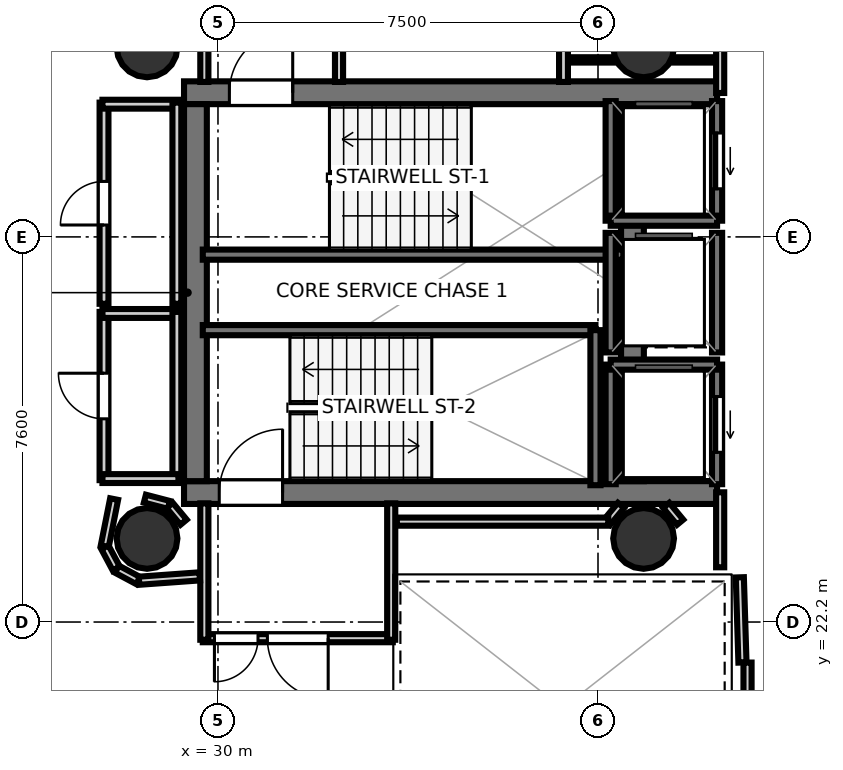
"""IFC4 building model, lengths in metres.
Left out: names, types, materials, properties, quantities, classifications, styles, units other than length and angle.
Written with IfcOpenShell. Run it as: python <this file> out.ifc"""

import sys

from ifc_helpers import new_model, si_unit, direction, frame, frame_2d, origin, origin_2d, place, context, subcontext, project, spatial, rectangle, hollow_circle, extrude, element, fill, save


model = new_model("IFC4")
c1 = context("Model", 3, precision=1e-05, world=origin(), true_north=direction((0.0, 1.0)))
c2 = subcontext(c1, "Body", "Model", "MODEL_VIEW")
j1 = project(units=[si_unit("LENGTHUNIT", "METRE"), si_unit("PLANEANGLEUNIT", "RADIAN")], contexts=[c1])
p1 = place(None, origin())
s1 = spatial("IfcSite", under=j1, at=p1, CompositionType="ELEMENT")
p2 = place(p1, origin())
s2 = spatial("IfcBuilding", under=s1, at=p2, CompositionType="ELEMENT")
p3 = place(p2, frame((0.0, 0.0, 196.6)))
s3 = spatial("IfcBuildingStorey", under=s2, at=p3, CompositionType="ELEMENT", Elevation=196.6)
p4 = place(p3, frame((29.33, 32.645, 0.0), z_axis=(0.0, 0.0, 1.0), x_axis=(1.0, 0.0, 0.0)))
e1 = element("IfcWall", 1, at=p4, inside=s3, PredefinedType="SHEAR", context=c2, shape_type="SweptSolid", body=[
    extrude(rectangle(XDim=10.52, YDim=0.45, at=frame_2d((5.26, 0.0))), origin(), (0.0, 0.0, 1.0), 3.52),
])
p5 = place(p4, frame((0.895, 0.0, 0.0)))
e2 = element("IfcOpeningElement", 2, at=p5, cuts=e1, PredefinedType="OPENING", context=c2, shape_type="SweptSolid", body=[
    extrude(rectangle(XDim=1.25, YDim=2.15, at=frame_2d((0.625, 1.075))), frame((0.0, 0.235, 0.0), z_axis=(0.0, -1.0, 0.0), x_axis=(1.0, 0.0, 0.0)), (0.0, 0.0, 1.0), 0.47),
])
p6 = place(p3, frame((29.33, 24.755, 0.0), z_axis=(0.0, 0.0, 1.0), x_axis=(1.0, 0.0, 0.0)))
e3 = element("IfcWall", 3, at=p6, inside=s3, PredefinedType="SHEAR", context=c2, shape_type="SweptSolid", body=[
    extrude(rectangle(XDim=10.52, YDim=0.45, at=frame_2d((5.26, 0.0))), origin(), (0.0, 0.0, 1.0), 3.52),
])
p7 = place(p6, frame((0.695, 0.0, 0.0)))
e4 = element("IfcOpeningElement", 4, at=p7, cuts=e3, PredefinedType="OPENING", context=c2, shape_type="SweptSolid", body=[
    extrude(rectangle(XDim=1.25, YDim=2.15, at=frame_2d((0.625, 1.075))), frame((0.0, 0.235, 0.0), z_axis=(0.0, -1.0, 0.0), x_axis=(1.0, 0.0, 0.0)), (0.0, 0.0, 1.0), 0.47),
])
for number, where, z_axis, x_axis in (
    (5, (29.555, 24.98, 0.0), (0.0, 0.0, 1.0), (0.0, 1.0, 0.0)),
    (6, (38.18, 24.98, 0.0), (0.0, 0.0, 1.0), (0.0, 1.0, 0.0)),
):
    element("IfcWall", number, at=place(p3, frame(where, z_axis=z_axis, x_axis=x_axis)), inside=s3, PredefinedType="SHEAR", context=c2, shape_type="SweptSolid", body=[
        extrude(rectangle(XDim=7.44, YDim=0.45, at=frame_2d((3.72, 0.0))), origin(), (0.0, 0.0, 1.0), 3.52),
    ])
for number, where, z_axis, x_axis in (
    (7, (28.6, 33.55, 0.0), (0.0, 0.0, 1.0), (1.0, 0.0, 0.0)),
    (8, (28.6, 23.85, 0.0), (0.0, 0.0, 1.0), (1.0, 0.0, 0.0)),
    (9, (38.4, 33.55, 0.0), (0.0, 0.0, 1.0), (1.0, 0.0, 0.0)),
    (10, (38.4, 23.85, 0.0), (0.0, 0.0, 1.0), (1.0, 0.0, 0.0)),
):
    element("IfcColumn", number, at=place(p3, frame(where, z_axis=z_axis, x_axis=x_axis)), inside=s3, PredefinedType="COLUMN", context=c2, shape_type="SweptSolid", body=[
        extrude(hollow_circle(Radius=0.6, WallThickness=0.03, at=origin_2d()), origin(), (0.0, 0.0, 1.0), 3.7),
    ])
p8 = place(p3, frame((29.7, 29.45, 0.0), z_axis=(0.0, 0.0, 1.0), x_axis=(1.0, 0.0, 0.0)))
e11 = element("IfcWall", 11, at=p8, inside=s3, PredefinedType="SOLIDWALL", context=c2, shape_type="SweptSolid", body=[
    extrude(rectangle(XDim=8.3, YDim=0.2, at=frame_2d((4.15, 0.0))), origin(), (0.0, 0.0, 1.0), 3.52),
])
p9 = place(p3, frame((29.7, 27.96, 0.0), z_axis=(0.0, 0.0, 1.0), x_axis=(1.0, 0.0, 0.0)))
e12 = element("IfcWall", 12, at=p9, inside=s3, PredefinedType="SOLIDWALL", context=c2, shape_type="SweptSolid", body=[
    extrude(rectangle(XDim=7.75, YDim=0.2, at=frame_2d((3.875, 0.0))), origin(), (0.0, 0.0, 1.0), 3.52),
])
p10 = place(p3, frame((37.45, 24.9, 0.0), z_axis=(0.0, 0.0, 1.0), x_axis=(0.0, 1.0, 0.0)))
e13 = element("IfcWall", 13, at=p10, inside=s3, PredefinedType="SOLIDWALL", context=c2, shape_type="SweptSolid", body=[
    extrude(rectangle(XDim=3.06, YDim=0.2, at=frame_2d((1.53, 0.0))), origin(), (0.0, 0.0, 1.0), 3.52),
])
p11 = place(p3, frame((39.85, 30.12, 0.0), z_axis=(0.0, 0.0, 1.0), x_axis=(0.0, 1.0, 0.0)))
e14 = element("IfcWall", 14, at=p11, inside=s3, PredefinedType="SOLIDWALL", context=c2, shape_type="SweptSolid", body=[
    extrude(rectangle(XDim=2.36, YDim=0.2, at=frame_2d((1.18, 0.0))), origin(), (0.0, 0.0, 1.0), 3.52),
])
p12 = place(p11, frame((0.63, 0.0, 0.0)))
e15 = element("IfcOpeningElement", 15, at=p12, cuts=e14, PredefinedType="OPENING", context=c2, shape_type="SweptSolid", body=[
    extrude(rectangle(XDim=1.1, YDim=2.15, at=frame_2d((0.55, 1.075))), frame((0.0, 0.11, 0.0), z_axis=(0.0, -1.0, 0.0), x_axis=(1.0, 0.0, 0.0)), (0.0, 0.0, 1.0), 0.22),
])
p13 = place(p3, frame((37.75, 30.12, 0.0), z_axis=(0.0, 0.0, 1.0), x_axis=(0.0, 1.0, 0.0)))
e16 = element("IfcWall", 16, at=p13, inside=s3, PredefinedType="SOLIDWALL", context=c2, shape_type="SweptSolid", body=[
    extrude(rectangle(XDim=2.36, YDim=0.2, at=frame_2d((1.18, 0.0))), origin(), (0.0, 0.0, 1.0), 3.52),
])
p14 = place(p3, frame((37.75, 30.12, 0.0), z_axis=(0.0, 0.0, 1.0), x_axis=(1.0, 0.0, 0.0)))
e17 = element("IfcWall", 17, at=p14, inside=s3, PredefinedType="SOLIDWALL", context=c2, shape_type="SweptSolid", body=[
    extrude(rectangle(XDim=2.1, YDim=0.2, at=frame_2d((1.05, 0.0))), origin(), (0.0, 0.0, 1.0), 3.52),
])
p15 = place(p3, frame((39.85, 24.92, 0.0), z_axis=(0.0, 0.0, 1.0), x_axis=(0.0, 1.0, 0.0)))
e18 = element("IfcWall", 18, at=p15, inside=s3, PredefinedType="SOLIDWALL", context=c2, shape_type="SweptSolid", body=[
    extrude(rectangle(XDim=2.36, YDim=0.2, at=frame_2d((1.18, 0.0))), origin(), (0.0, 0.0, 1.0), 3.52),
])
p16 = place(p15, frame((0.63, 0.0, 0.0)))
e19 = element("IfcOpeningElement", 19, at=p16, cuts=e18, PredefinedType="OPENING", context=c2, shape_type="SweptSolid", body=[
    extrude(rectangle(XDim=1.1, YDim=2.15, at=frame_2d((0.55, 1.075))), frame((0.0, 0.11, 0.0), z_axis=(0.0, -1.0, 0.0), x_axis=(1.0, 0.0, 0.0)), (0.0, 0.0, 1.0), 0.22),
])
p17 = place(p3, frame((37.75, 24.92, 0.0), z_axis=(0.0, 0.0, 1.0), x_axis=(0.0, 1.0, 0.0)))
e20 = element("IfcWall", 20, at=p17, inside=s3, PredefinedType="SOLIDWALL", context=c2, shape_type="SweptSolid", body=[
    extrude(rectangle(XDim=2.36, YDim=0.2, at=frame_2d((1.18, 0.0))), origin(), (0.0, 0.0, 1.0), 3.52),
])
p18 = place(p3, frame((37.75, 27.28, 0.0), z_axis=(0.0, 0.0, 1.0), x_axis=(1.0, 0.0, 0.0)))
e21 = element("IfcWall", 21, at=p18, inside=s3, PredefinedType="SOLIDWALL", context=c2, shape_type="SweptSolid", body=[
    extrude(rectangle(XDim=2.1, YDim=0.2, at=frame_2d((1.05, 0.0))), origin(), (0.0, 0.0, 1.0), 3.52),
])
for number, where, z_axis, x_axis in (
    (22, (39.85, 27.52, 0.0), (0.0, 0.0, 1.0), (0.0, 1.0, 0.0)),
    (23, (37.75, 27.52, 0.0), (0.0, 0.0, 1.0), (0.0, 1.0, 0.0)),
):
    element("IfcWall", number, at=place(p3, frame(where, z_axis=z_axis, x_axis=x_axis)), inside=s3, PredefinedType="SOLIDWALL", context=c2, shape_type="SweptSolid", body=[
        extrude(rectangle(XDim=2.36, YDim=0.2, at=frame_2d((1.18, 0.0))), origin(), (0.0, 0.0, 1.0), 3.52),
    ])
p19 = place(p3, frame((29.731, 32.858, 0.0), z_axis=(0.0, 0.0, 1.0), x_axis=(0.0, 1.0, 0.0)))
e24 = element("IfcWall", 24, at=p19, inside=s3, PredefinedType="PARTITIONING", context=c2, shape_type="SweptSolid", body=[
    extrude(rectangle(XDim=2.662, YDim=0.16, at=frame_2d((1.331, 0.0))), origin(), (0.0, 0.0, 1.0), 2.84),
])
p20 = place(p19, frame((1.478, 0.0, 0.0)))
e25 = element("IfcOpeningElement", 25, at=p20, cuts=e24, PredefinedType="OPENING", context=c2, shape_type="SweptSolid", body=[
    extrude(rectangle(XDim=0.86, YDim=2.05, at=frame_2d((0.43, 1.025))), frame((0.0, 0.09, 0.0), z_axis=(0.0, -1.0, 0.0), x_axis=(1.0, 0.0, 0.0)), (0.0, 0.0, 1.0), 0.18),
])
p21 = place(p3, frame((32.389, 35.52, 0.0), z_axis=(0.0, 0.0, 1.0), x_axis=(0.0, -1.0, 0.0)))
e26 = element("IfcWall", 26, at=p21, inside=s3, PredefinedType="PARTITIONING", context=c2, shape_type="SweptSolid", body=[
    extrude(rectangle(XDim=2.662, YDim=0.16, at=frame_2d((1.331, 0.0))), origin(), (0.0, 0.0, 1.0), 2.84),
])
p22 = place(p3, frame((33.45, 21.881, 0.0), z_axis=(0.0, 0.0, 1.0), x_axis=(-1.0, 0.0, 0.0)))
e27 = element("IfcWall", 27, at=p22, inside=s3, PredefinedType="PARTITIONING", context=c2, shape_type="SweptSolid", body=[
    extrude(rectangle(XDim=3.75, YDim=0.16, at=frame_2d((1.875, 0.0))), origin(), (0.0, 0.0, 1.0), 2.84),
])
p23 = place(p22, frame((1.275, 0.0, 0.0)))
e28 = element("IfcOpeningElement", 28, at=p23, cuts=e27, PredefinedType="OPENING", context=c2, shape_type="SweptSolid", body=[
    extrude(rectangle(XDim=1.2, YDim=2.15, at=frame_2d((0.6, 1.075))), frame((0.0, 0.09, 0.0), z_axis=(0.0, -1.0, 0.0), x_axis=(1.0, 0.0, 0.0)), (0.0, 0.0, 1.0), 0.18),
])
p24 = place(p22, frame((2.66, 0.0, 0.0)))
e29 = element("IfcOpeningElement", 29, at=p24, cuts=e27, PredefinedType="OPENING", context=c2, shape_type="SweptSolid", body=[
    extrude(rectangle(XDim=0.86, YDim=2.05, at=frame_2d((0.43, 1.025))), frame((0.0, 0.09, 0.0), z_axis=(0.0, -1.0, 0.0), x_axis=(1.0, 0.0, 0.0)), (0.0, 0.0, 1.0), 0.18),
])
for number, where, z_axis, x_axis in (
    (30, (29.731, 21.85, 0.0), (0.0, 0.0, 1.0), (0.0, 1.0, 0.0)),
    (31, (33.419, 24.542, 0.0), (0.0, 0.0, 1.0), (0.0, -1.0, 0.0)),
):
    element("IfcWall", number, at=place(p3, frame(where, z_axis=z_axis, x_axis=x_axis)), inside=s3, PredefinedType="PARTITIONING", context=c2, shape_type="SweptSolid", body=[
        extrude(rectangle(XDim=2.692, YDim=0.16, at=frame_2d((1.346, 0.0))), origin(), (0.0, 0.0, 1.0), 2.84),
    ])
p25 = place(p3, frame((40.351, 21.401, 0.0), z_axis=(0.0, 0.0, 1.0), x_axis=(-0.031058045979, 0.999517582527, 0.0)))
e32 = element("IfcWall", 32, at=p25, inside=s3, PredefinedType="PARTITIONING", context=c2, shape_type="SweptSolid", body=[
    extrude(rectangle(XDim=1.682, YDim=0.16, at=frame_2d((0.841, 0.0))), origin(), (0.0, 0.0, 1.0), 2.84),
])
p26 = place(p3, frame((39.911, 23.28, 0.0), z_axis=(0.0, 0.0, 1.0), x_axis=(0.0, 1.0, 0.0)))
e33 = element("IfcWall", 33, at=p26, inside=s3, PredefinedType="PARTITIONING", context=c2, shape_type="SweptSolid", body=[
    extrude(rectangle(XDim=1.48, YDim=0.16, at=frame_2d((0.74, 0.0))), origin(), (0.0, 0.0, 1.0), 2.84),
])
p27 = place(p3, frame((39.911, 32.64, 0.0), z_axis=(0.0, 0.0, 1.0), x_axis=(0.0, 1.0, 0.0)))
e34 = element("IfcWall", 34, at=p27, inside=s3, PredefinedType="PARTITIONING", context=c2, shape_type="SweptSolid", body=[
    extrude(rectangle(XDim=2.604, YDim=0.16, at=frame_2d((1.302, 0.0))), origin(), (0.0, 0.0, 1.0), 2.84),
])
p28 = place(p3, frame((40.451, 18.08, 0.0), z_axis=(0.0, 0.0, 1.0), x_axis=(0.0, 1.0, 0.0)))
e35 = element("IfcWall", 35, at=p28, inside=s3, PredefinedType="PARTITIONING", context=c2, shape_type="SweptSolid", body=[
    extrude(rectangle(XDim=3.32, YDim=0.16, at=frame_2d((1.66, 0.0))), origin(), (0.0, 0.0, 1.0), 2.84),
])
p29 = place(p3, frame((36.819, 35.48, 0.0), z_axis=(0.0, 0.0, 1.0), x_axis=(0.0, -1.0, 0.0)))
e36 = element("IfcWall", 36, at=p29, inside=s3, PredefinedType="PLUMBINGWALL", context=c2, shape_type="SweptSolid", body=[
    extrude(rectangle(XDim=2.622, YDim=0.175, at=frame_2d((1.311, 0.0))), origin(), (0.0, 0.0, 1.0), 2.84),
])
p30 = place(p3, frame((27.751, 25.0, 0.0), z_axis=(0.0, 0.0, 1.0), x_axis=(0.0, 1.0, 0.0)))
e37 = element("IfcWall", 37, at=p30, inside=s3, PredefinedType="PLUMBINGWALL", context=c2, shape_type="SweptSolid", body=[
    extrude(rectangle(XDim=3.32, YDim=0.175, at=frame_2d((1.66, 0.0))), origin(), (0.0, 0.0, 1.0), 2.84),
])
p31 = place(p30, frame((1.21, 0.0, 0.0)))
e38 = element("IfcOpeningElement", 38, at=p31, cuts=e37, PredefinedType="OPENING", context=c2, shape_type="SweptSolid", body=[
    extrude(rectangle(XDim=0.9, YDim=2.1, at=frame_2d((0.45, 1.05))), frame((0.0, 0.097, 0.0), z_axis=(0.0, -1.0, 0.0), x_axis=(1.0, 0.0, 0.0)), (0.0, 0.0, 1.0), 0.195),
])
p32 = place(p3, frame((27.72, 28.289, 0.0), z_axis=(0.0, 0.0, 1.0), x_axis=(1.0, 0.0, 0.0)))
e39 = element("IfcWall", 39, at=p32, inside=s3, PredefinedType="PLUMBINGWALL", context=c2, shape_type="SweptSolid", body=[
    extrude(rectangle(XDim=1.5, YDim=0.175, at=frame_2d((0.75, 0.0))), origin(), (0.0, 0.0, 1.0), 2.84),
])
p33 = place(p3, frame((29.189, 28.32, 0.0), z_axis=(0.0, 0.0, 1.0), x_axis=(0.0, -1.0, 0.0)))
e40 = element("IfcWall", 40, at=p33, inside=s3, PredefinedType="PLUMBINGWALL", context=c2, shape_type="SweptSolid", body=[
    extrude(rectangle(XDim=3.32, YDim=0.175, at=frame_2d((1.66, 0.0))), origin(), (0.0, 0.0, 1.0), 2.84),
])
p34 = place(p3, frame((29.22, 25.031, 0.0), z_axis=(0.0, 0.0, 1.0), x_axis=(-1.0, 0.0, 0.0)))
e41 = element("IfcWall", 41, at=p34, inside=s3, PredefinedType="PLUMBINGWALL", context=c2, shape_type="SweptSolid", body=[
    extrude(rectangle(XDim=1.5, YDim=0.175, at=frame_2d((0.75, 0.0))), origin(), (0.0, 0.0, 1.0), 2.84),
])
p35 = place(p3, frame((27.751, 28.48, 0.0), z_axis=(0.0, 0.0, 1.0), x_axis=(0.0, 1.0, 0.0)))
e42 = element("IfcWall", 42, at=p35, inside=s3, PredefinedType="PLUMBINGWALL", context=c2, shape_type="SweptSolid", body=[
    extrude(rectangle(XDim=3.97, YDim=0.175, at=frame_2d((1.985, 0.0))), origin(), (0.0, 0.0, 1.0), 2.84),
])
p36 = place(p35, frame((1.555, 0.0, 0.0)))
e43 = element("IfcOpeningElement", 43, at=p36, cuts=e42, PredefinedType="OPENING", context=c2, shape_type="SweptSolid", body=[
    extrude(rectangle(XDim=0.86, YDim=2.05, at=frame_2d((0.43, 1.025))), frame((0.0, 0.097, 0.0), z_axis=(0.0, -1.0, 0.0), x_axis=(1.0, 0.0, 0.0)), (0.0, 0.0, 1.0), 0.195),
])
p37 = place(p3, frame((27.72, 32.419, 0.0), z_axis=(0.0, 0.0, 1.0), x_axis=(1.0, 0.0, 0.0)))
e44 = element("IfcWall", 44, at=p37, inside=s3, PredefinedType="PLUMBINGWALL", context=c2, shape_type="SweptSolid", body=[
    extrude(rectangle(XDim=1.5, YDim=0.175, at=frame_2d((0.75, 0.0))), origin(), (0.0, 0.0, 1.0), 2.84),
])
p38 = place(p3, frame((29.189, 32.45, 0.0), z_axis=(0.0, 0.0, 1.0), x_axis=(0.0, -1.0, 0.0)))
e45 = element("IfcWall", 45, at=p38, inside=s3, PredefinedType="PLUMBINGWALL", context=c2, shape_type="SweptSolid", body=[
    extrude(rectangle(XDim=3.97, YDim=0.175, at=frame_2d((1.985, 0.0))), origin(), (0.0, 0.0, 1.0), 2.84),
])
p39 = place(p3, frame((29.321, 24.17, 0.0), z_axis=(0.0, 0.0, 1.0), x_axis=(-0.638008265708, 0.770029514296, 0.0)))
e46 = element("IfcWall", 46, at=p39, inside=s3, PredefinedType="PARTITIONING", context=c2, shape_type="SweptSolid", body=[
    extrude(rectangle(XDim=0.431, YDim=0.16, at=frame_2d((0.215, 0.0))), origin(), (0.0, 0.0, 1.0), 2.84),
])
p40 = place(p3, frame((29.03, 24.512, 0.0), z_axis=(0.0, 0.0, 1.0), x_axis=(-0.967681003213, 0.252177469296, 0.0)))
e47 = element("IfcWall", 47, at=p40, inside=s3, PredefinedType="PARTITIONING", context=c2, shape_type="SweptSolid", body=[
    extrude(rectangle(XDim=0.488, YDim=0.16, at=frame_2d((0.244, 0.0))), origin(), (0.0, 0.0, 1.0), 2.84),
])
for number, where, z_axis, x_axis in (
    (48, (39.121, 24.17, 0.0), (0.0, 0.0, 1.0), (-0.638, 0.77, 0.0)),
    (49, (37.954, 24.502, 0.0), (0.0, 0.0, 1.0), (-0.638, -0.77, 0.0)),
):
    element("IfcWall", number, at=place(p3, frame(where, z_axis=z_axis, x_axis=x_axis)), inside=s3, PredefinedType="PARTITIONING", context=c2, shape_type="SweptSolid", body=[
        extrude(rectangle(XDim=0.431, YDim=0.16, at=frame_2d((0.215, 0.0))), origin(), (0.0, 0.0, 1.0), 2.84),
    ])
p41 = place(p3, frame((37.703, 24.181, 0.0), z_axis=(0.0, 0.0, 1.0), x_axis=(-1.0, 0.0, 0.0)))
e50 = element("IfcWall", 50, at=p41, inside=s3, PredefinedType="PARTITIONING", context=c2, shape_type="SweptSolid", body=[
    extrude(rectangle(XDim=4.173, YDim=0.16, at=frame_2d((2.086, 0.0))), origin(), (0.0, 0.0, 1.0), 2.84),
])
p42 = place(p3, frame((27.95, 24.626, 0.0), z_axis=(0.0, 0.0, 1.0), x_axis=(-0.195125950178, -0.980778192848, 0.0)))
e51 = element("IfcWall", 51, at=p42, inside=s3, PredefinedType="PARTITIONING", context=c2, shape_type="SweptSolid", body=[
    extrude(rectangle(XDim=0.948, YDim=0.16, at=frame_2d((0.474, 0.0))), origin(), (0.0, 0.0, 1.0), 2.84),
])
for number, where, z_axis, x_axis in (
    (52, (27.768, 23.675, 0.0), (0.0, 0.0, 1.0), (0.472, -0.882, 0.0)),
    (53, (28.006, 23.243, 0.0), (0.0, 0.0, 1.0), (0.882, -0.472, 0.0)),
):
    element("IfcWall", number, at=place(p3, frame(where, z_axis=z_axis, x_axis=x_axis)), inside=s3, PredefinedType="PARTITIONING", context=c2, shape_type="SweptSolid", body=[
        extrude(rectangle(XDim=0.476, YDim=0.16, at=frame_2d((0.238, 0.0))), origin(), (0.0, 0.0, 1.0), 2.84),
    ])
p43 = place(p3, frame((28.442, 23.015, 0.0), z_axis=(0.0, 0.0, 1.0), x_axis=(0.99740683837, 0.07196942943, 0.0)))
e54 = element("IfcWall", 54, at=p43, inside=s3, PredefinedType="PARTITIONING", context=c2, shape_type="SweptSolid", body=[
    extrude(rectangle(XDim=1.201, YDim=0.16, at=frame_2d((0.601, 0.0))), origin(), (0.0, 0.0, 1.0), 2.84),
])
p44 = place(p3, frame((39.8, 33.293, 0.0), z_axis=(0.0, 0.0, 1.0), x_axis=(-1.0, 0.0, 0.0)))
e55 = element("IfcWall", 55, at=p44, inside=s3, PredefinedType="PARTITIONING", context=c2, shape_type="SweptSolid", body=[
    extrude(rectangle(XDim=2.87, YDim=0.105, at=frame_2d((1.435, 0.0))), origin(), (0.0, 0.0, 1.0), 2.84),
])
p45 = place(p5, origin())
e56 = element("IfcDoor", 56, at=p45, inside=s3, OperationType="SINGLE_SWING_RIGHT", PredefinedType="DOOR", context=c2, shape_type="SweptSolid", body=[
    extrude(rectangle(XDim=1.25, YDim=2.15, at=frame_2d((0.625, 1.075))), frame((0.0, 0.025, 0.0), z_axis=(0.0, -1.0, 0.0), x_axis=(1.0, 0.0, 0.0)), (0.0, 0.0, 1.0), 0.05),
])
fill(e2, e56)
p46 = place(p7, origin())
e57 = element("IfcDoor", 57, at=p46, inside=s3, OperationType="SINGLE_SWING_RIGHT", PredefinedType="DOOR", context=c2, shape_type="SweptSolid", body=[
    extrude(rectangle(XDim=1.25, YDim=2.15, at=frame_2d((0.625, 1.075))), frame((0.0, 0.025, 0.0), z_axis=(0.0, -1.0, 0.0), x_axis=(1.0, 0.0, 0.0)), (0.0, 0.0, 1.0), 0.05),
])
fill(e4, e57)
p47 = place(p12, origin())
e58 = element("IfcDoor", 58, at=p47, inside=s3, OperationType="SLIDING_TO_LEFT", PredefinedType="DOOR", context=c2, shape_type="SweptSolid", body=[
    extrude(rectangle(XDim=1.1, YDim=2.15, at=frame_2d((0.55, 1.075))), frame((0.0, 0.025, 0.0), z_axis=(0.0, -1.0, 0.0), x_axis=(1.0, 0.0, 0.0)), (0.0, 0.0, 1.0), 0.05),
])
fill(e15, e58)
p48 = place(p16, origin())
e59 = element("IfcDoor", 59, at=p48, inside=s3, OperationType="SLIDING_TO_LEFT", PredefinedType="DOOR", context=c2, shape_type="SweptSolid", body=[
    extrude(rectangle(XDim=1.1, YDim=2.15, at=frame_2d((0.55, 1.075))), frame((0.0, 0.025, 0.0), z_axis=(0.0, -1.0, 0.0), x_axis=(1.0, 0.0, 0.0)), (0.0, 0.0, 1.0), 0.05),
])
fill(e19, e59)
p49 = place(p23, origin())
e60 = element("IfcDoor", 60, at=p49, inside=s3, OperationType="SINGLE_SWING_LEFT", PredefinedType="DOOR", context=c2, shape_type="SweptSolid", body=[
    extrude(rectangle(XDim=1.2, YDim=2.15, at=frame_2d((0.6, 1.075))), frame((0.0, 0.025, 0.0), z_axis=(0.0, -1.0, 0.0), x_axis=(1.0, 0.0, 0.0)), (0.0, 0.0, 1.0), 0.05),
])
fill(e28, e60)
p50 = place(p31, origin())
e61 = element("IfcDoor", 61, at=p50, inside=s3, OperationType="SINGLE_SWING_RIGHT", PredefinedType="DOOR", context=c2, shape_type="SweptSolid", body=[
    extrude(rectangle(XDim=0.9, YDim=2.1, at=frame_2d((0.45, 1.05))), frame((0.0, 0.025, 0.0), z_axis=(0.0, -1.0, 0.0), x_axis=(1.0, 0.0, 0.0)), (0.0, 0.0, 1.0), 0.05),
])
fill(e38, e61)
p51 = place(p36, origin())
e62 = element("IfcDoor", 62, at=p51, inside=s3, OperationType="SINGLE_SWING_LEFT", PredefinedType="DOOR", context=c2, shape_type="SweptSolid", body=[
    extrude(rectangle(XDim=0.86, YDim=2.05, at=frame_2d((0.43, 1.025))), frame((0.0, 0.025, 0.0), z_axis=(0.0, -1.0, 0.0), x_axis=(1.0, 0.0, 0.0)), (0.0, 0.0, 1.0), 0.05),
])
fill(e43, e62)
p52 = place(p24, origin())
e63 = element("IfcDoor", 63, at=p52, inside=s3, OperationType="SINGLE_SWING_RIGHT", PredefinedType="DOOR", context=c2, shape_type="SweptSolid", body=[
    extrude(rectangle(XDim=0.86, YDim=2.05, at=frame_2d((0.43, 1.025))), frame((0.0, 0.025, 0.0), z_axis=(0.0, -1.0, 0.0), x_axis=(1.0, 0.0, 0.0)), (0.0, 0.0, 1.0), 0.05),
])
fill(e29, e63)
save(model, sys.argv[1])
